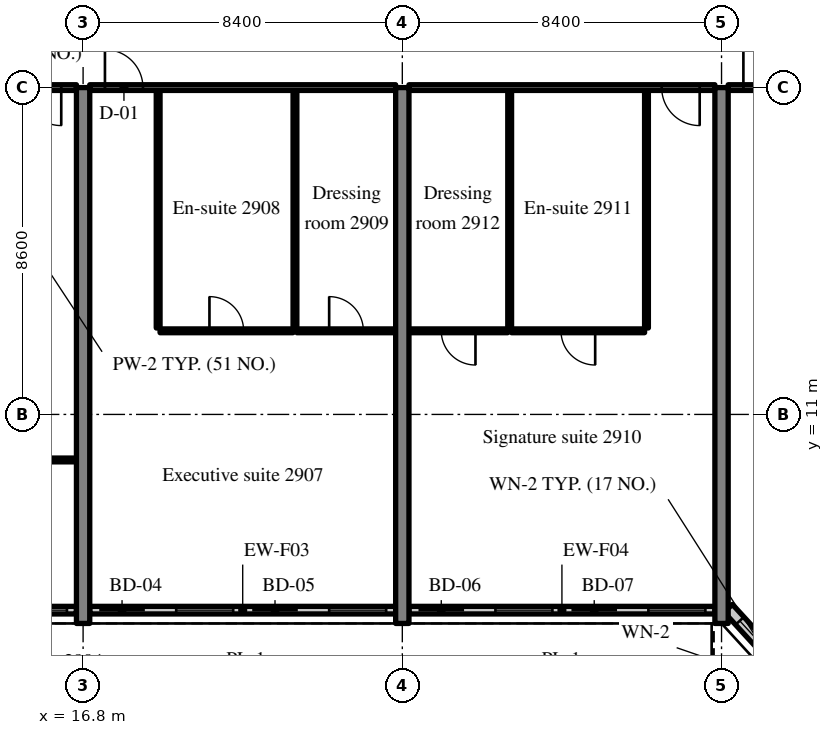
"""IFC4 building model, lengths in metres.
Left out: names, types, materials, properties, quantities, classifications, styles, units other than length and angle.
Written with IfcOpenShell. Run it as: python <this file> out.ifc"""

import sys

from ifc_helpers import new_model, si_unit, direction, frame, frame_2d, origin, place, context, subcontext, project, spatial, rectangle, extrude, source, transform, mapped, element, fill, save


model = new_model("IFC4")
c1 = context("Model", 3, precision=1e-05, world=origin(), true_north=direction((0.0, 1.0)))
c2 = subcontext(c1, "Body", "Model", "MODEL_VIEW")
j1 = project(units=[si_unit("LENGTHUNIT", "METRE"), si_unit("PLANEANGLEUNIT", "RADIAN")], contexts=[c1])
p1 = place(None, origin())
s1 = spatial("IfcSite", under=j1, at=p1, CompositionType="ELEMENT")
p2 = place(p1, origin())
s2 = spatial("IfcBuilding", under=s1, at=p2, CompositionType="ELEMENT")
p3 = place(p2, frame((0.0, 0.0, 121.8)))
s3 = spatial("IfcBuildingStorey", under=s2, at=p3, CompositionType="ELEMENT", Elevation=121.8)
m1 = source(origin(), c2, "Body", "SweptSolid", [
    extrude(rectangle(XDim=14.1, YDim=0.35, at=frame_2d((7.05, 0.0))), origin(), (0.0, 0.0, 1.0), 3.52),
])
for number, where, z_axis, x_axis in (
    (1, (16.8, 5.5, 0.0), (0.0, 0.0, 1.0), (0.0, 1.0, 0.0)),
    (2, (25.2, 5.5, 0.0), (0.0, 0.0, 1.0), (0.0, 1.0, 0.0)),
    (3, (33.6, 5.5, 0.0), (0.0, 0.0, 1.0), (0.0, 1.0, 0.0)),
):
    element("IfcWall", number, at=place(p3, frame(where, z_axis=z_axis, x_axis=x_axis)), inside=s3, PredefinedType="SHEAR", context=c2, shape_type="MappedRepresentation", body=[
        mapped(m1, transform((0.0, 0.0, 0.0), scale=1.0)),
    ])
m2 = source(origin(), c2, "Body", "SweptSolid", [
    extrude(rectangle(XDim=8.05, YDim=0.2, at=frame_2d((4.025, 0.0))), origin(), (0.0, 0.0, 1.0), 2.82),
])
p4 = place(p3, frame((8.575, 5.85, 0.0), z_axis=(0.0, 0.0, 1.0), x_axis=(1.0, 0.0, 0.0)))
e4 = element("IfcWall", 4, at=p4, inside=s3, PredefinedType="SOLIDWALL", context=c2, shape_type="MappedRepresentation", body=[
    mapped(m2, transform((0.0, 0.0, 0.0), scale=1.0)),
])
m3 = source(origin(), c2, "Body", "SweptSolid", [
    extrude(rectangle(XDim=1.2, YDim=2.4, at=frame_2d((0.6, 1.2))), frame((0.0, 0.11, 0.0), z_axis=(0.0, -1.0, 0.0), x_axis=(1.0, 0.0, 0.0)), (0.0, 0.0, 1.0), 0.22),
])
p5 = place(p4, frame((0.25, 0.0, 0.0)))
e5 = element("IfcOpeningElement", 5, at=p5, cuts=e4, PredefinedType="OPENING", context=c2, shape_type="MappedRepresentation", body=[
    mapped(m3, transform((0.0, 0.0, 0.0), scale=1.0)),
])
m4 = source(origin(), c2, "Body", "SweptSolid", [
    extrude(rectangle(XDim=1.5, YDim=1.5, at=frame_2d((0.75, 0.75))), frame((0.0, 0.11, 0.0), z_axis=(0.0, -1.0, 0.0), x_axis=(1.0, 0.0, 0.0)), (0.0, 0.0, 1.0), 0.22),
])
p6 = place(p4, frame((2.275, 0.0, 0.9)))
e6 = element("IfcOpeningElement", 6, at=p6, cuts=e4, PredefinedType="OPENING", context=c2, shape_type="MappedRepresentation", body=[
    mapped(m4, transform((0.0, 0.0, 0.0), scale=1.0)),
])
p7 = place(p4, frame((4.275, 0.0, 0.0)))
e7 = element("IfcOpeningElement", 7, at=p7, cuts=e4, PredefinedType="OPENING", context=c2, shape_type="MappedRepresentation", body=[
    mapped(m3, transform((0.0, 0.0, 0.0), scale=1.0)),
])
p8 = place(p4, frame((6.3, 0.0, 0.9)))
e8 = element("IfcOpeningElement", 8, at=p8, cuts=e4, PredefinedType="OPENING", context=c2, shape_type="MappedRepresentation", body=[
    mapped(m4, transform((0.0, 0.0, 0.0), scale=1.0)),
])
m5 = source(origin(), c2, "Body", "SweptSolid", [
    extrude(rectangle(XDim=8.05, YDim=0.2, at=frame_2d((4.025, 0.0))), origin(), (0.0, 0.0, 1.0), 2.82),
])
p9 = place(p3, frame((16.975, 5.85, 0.0), z_axis=(0.0, 0.0, 1.0), x_axis=(1.0, 0.0, 0.0)))
e9 = element("IfcWall", 9, at=p9, inside=s3, PredefinedType="SOLIDWALL", context=c2, shape_type="MappedRepresentation", body=[
    mapped(m5, transform((0.0, 0.0, 0.0), scale=1.0)),
])
p10 = place(p9, frame((0.25, 0.0, 0.0)))
e10 = element("IfcOpeningElement", 10, at=p10, cuts=e9, PredefinedType="OPENING", context=c2, shape_type="MappedRepresentation", body=[
    mapped(m3, transform((0.0, 0.0, 0.0), scale=1.0)),
])
p11 = place(p9, frame((2.275, 0.0, 0.9)))
e11 = element("IfcOpeningElement", 11, at=p11, cuts=e9, PredefinedType="OPENING", context=c2, shape_type="MappedRepresentation", body=[
    mapped(m4, transform((0.0, 0.0, 0.0), scale=1.0)),
])
p12 = place(p9, frame((4.275, 0.0, 0.0)))
e12 = element("IfcOpeningElement", 12, at=p12, cuts=e9, PredefinedType="OPENING", context=c2, shape_type="MappedRepresentation", body=[
    mapped(m3, transform((0.0, 0.0, 0.0), scale=1.0)),
])
p13 = place(p9, frame((6.3, 0.0, 0.9)))
e13 = element("IfcOpeningElement", 13, at=p13, cuts=e9, PredefinedType="OPENING", context=c2, shape_type="MappedRepresentation", body=[
    mapped(m4, transform((0.0, 0.0, 0.0), scale=1.0)),
])
p14 = place(p3, frame((25.375, 5.85, 0.0), z_axis=(0.0, 0.0, 1.0), x_axis=(1.0, 0.0, 0.0)))
e14 = element("IfcWall", 14, at=p14, inside=s3, PredefinedType="SOLIDWALL", context=c2, shape_type="MappedRepresentation", body=[
    mapped(m2, transform((0.0, 0.0, 0.0), scale=1.0)),
])
p15 = place(p14, frame((0.25, 0.0, 0.0)))
e15 = element("IfcOpeningElement", 15, at=p15, cuts=e14, PredefinedType="OPENING", context=c2, shape_type="MappedRepresentation", body=[
    mapped(m3, transform((0.0, 0.0, 0.0), scale=1.0)),
])
p16 = place(p14, frame((2.275, 0.0, 0.9)))
e16 = element("IfcOpeningElement", 16, at=p16, cuts=e14, PredefinedType="OPENING", context=c2, shape_type="MappedRepresentation", body=[
    mapped(m4, transform((0.0, 0.0, 0.0), scale=1.0)),
])
p17 = place(p14, frame((4.275, 0.0, 0.0)))
e17 = element("IfcOpeningElement", 17, at=p17, cuts=e14, PredefinedType="OPENING", context=c2, shape_type="MappedRepresentation", body=[
    mapped(m3, transform((0.0, 0.0, 0.0), scale=1.0)),
])
p18 = place(p14, frame((6.3, 0.0, 0.9)))
e18 = element("IfcOpeningElement", 18, at=p18, cuts=e14, PredefinedType="OPENING", context=c2, shape_type="MappedRepresentation", body=[
    mapped(m4, transform((0.0, 0.0, 0.0), scale=1.0)),
])
m6 = source(origin(), c2, "Body", "SweptSolid", [
    extrude(rectangle(XDim=2.398, YDim=0.3, at=frame_2d((1.199, 0.0))), origin(), (0.0, 0.0, 1.0), 3.52),
])
p19 = place(p3, frame((33.776, 5.9, 0.0), z_axis=(0.0, 0.0, 1.0), x_axis=(0.675374189419, -0.737475222815, 0.0)))
e19 = element("IfcWall", 19, at=p19, inside=s3, PredefinedType="SOLIDWALL", context=c2, shape_type="MappedRepresentation", body=[
    mapped(m6, transform((0.0, 0.0, 0.0), scale=1.0)),
])
m7 = source(origin(), c2, "Body", "SweptSolid", [
    extrude(rectangle(XDim=1.5, YDim=2.0, at=frame_2d((0.75, 1.0))), frame((0.0, 0.16, 0.0), z_axis=(0.0, -1.0, 0.0), x_axis=(1.0, 0.0, 0.0)), (0.0, 0.0, 1.0), 0.32),
])
p20 = place(p19, frame((0.449, 0.0, 0.9)))
e20 = element("IfcOpeningElement", 20, at=p20, cuts=e19, PredefinedType="OPENING", context=c2, shape_type="MappedRepresentation", body=[
    mapped(m7, transform((0.0, 0.0, 0.0), scale=1.0)),
])
m8 = source(origin(), c2, "Body", "SweptSolid", [
    extrude(rectangle(XDim=8.05, YDim=0.1, at=frame_2d((4.025, 0.0))), origin(), (0.0, 0.0, 1.0), 3.52),
])
p21 = place(p3, frame((8.575, 9.802, 0.0), z_axis=(0.0, 0.0, 1.0), x_axis=(1.0, 0.0, 0.0)))
e21 = element("IfcWall", 21, at=p21, inside=s3, PredefinedType="PARTITIONING", context=c2, shape_type="MappedRepresentation", body=[
    mapped(m8, transform((0.0, 0.0, 0.0), scale=1.0)),
])
m9 = source(origin(), c2, "Body", "SweptSolid", [
    extrude(rectangle(XDim=1.8, YDim=2.1, at=frame_2d((0.9, 1.05))), frame((0.0, 0.06, 0.0), z_axis=(0.0, -1.0, 0.0), x_axis=(1.0, 0.0, 0.0)), (0.0, 0.0, 1.0), 0.12),
])
p22 = place(p21, frame((3.125, 0.0, 0.0)))
e22 = element("IfcOpeningElement", 22, at=p22, cuts=e21, PredefinedType="OPENING", context=c2, shape_type="MappedRepresentation", body=[
    mapped(m9, transform((0.0, 0.0, 0.0), scale=1.0)),
])
m10 = source(origin(), c2, "Body", "SweptSolid", [
    extrude(rectangle(XDim=8.05, YDim=0.15, at=frame_2d((4.025, 0.0))), origin(), (0.0, 0.0, 1.0), 2.82),
])
p23 = place(p3, frame((8.575, 19.6, 0.0), z_axis=(0.0, 0.0, 1.0), x_axis=(1.0, 0.0, 0.0)))
e23 = element("IfcWall", 23, at=p23, inside=s3, PredefinedType="PARTITIONING", context=c2, shape_type="MappedRepresentation", body=[
    mapped(m10, transform((0.0, 0.0, 0.0), scale=1.0)),
])
m11 = source(origin(), c2, "Body", "SweptSolid", [
    extrude(rectangle(XDim=1.0, YDim=2.1, at=frame_2d((0.5, 1.05))), frame((0.0, 0.085, 0.0), z_axis=(0.0, -1.0, 0.0), x_axis=(1.0, 0.0, 0.0)), (0.0, 0.0, 1.0), 0.17),
])
p24 = place(p23, frame((6.65, 0.0, 0.0)))
e24 = element("IfcOpeningElement", 24, at=p24, cuts=e23, PredefinedType="OPENING", context=c2, shape_type="MappedRepresentation", body=[
    mapped(m11, transform((0.0, 0.0, 0.0), scale=1.0)),
])
m12 = source(origin(), c2, "Body", "SweptSolid", [
    extrude(rectangle(XDim=6.25, YDim=0.1, at=frame_2d((3.125, 0.0))), origin(), (0.0, 0.0, 1.0), 3.52),
])
for number, where, z_axis, x_axis in (
    (25, (18.775, 13.275, 0.0), (0.0, 0.0, 1.0), (0.0, 1.0, 0.0)),
    (26, (22.375, 13.275, 0.0), (0.0, 0.0, 1.0), (0.0, 1.0, 0.0)),
):
    element("IfcWall", number, at=place(p3, frame(where, z_axis=z_axis, x_axis=x_axis)), inside=s3, PredefinedType="PARTITIONING", context=c2, shape_type="MappedRepresentation", body=[
        mapped(m12, transform((0.0, 0.0, 0.0), scale=1.0)),
    ])
m13 = source(origin(), c2, "Body", "SweptSolid", [
    extrude(rectangle(XDim=3.5, YDim=0.1, at=frame_2d((1.75, 0.0))), origin(), (0.0, 0.0, 1.0), 3.52),
])
p25 = place(p3, frame((18.825, 13.2, 0.0), z_axis=(0.0, 0.0, 1.0), x_axis=(1.0, 0.0, 0.0)))
e27 = element("IfcWall", 27, at=p25, inside=s3, PredefinedType="PARTITIONING", context=c2, shape_type="MappedRepresentation", body=[
    mapped(m13, transform((0.0, 0.0, 0.0), scale=1.0)),
])
m14 = source(origin(), c2, "Body", "SweptSolid", [
    extrude(rectangle(XDim=0.9, YDim=2.1, at=frame_2d((0.45, 1.05))), frame((0.0, 0.06, 0.0), z_axis=(0.0, -1.0, 0.0), x_axis=(1.0, 0.0, 0.0)), (0.0, 0.0, 1.0), 0.12),
])
p26 = place(p25, frame((1.3, 0.0, 0.0)))
e28 = element("IfcOpeningElement", 28, at=p26, cuts=e27, PredefinedType="OPENING", context=c2, shape_type="MappedRepresentation", body=[
    mapped(m14, transform((0.0, 0.0, 0.0), scale=1.0)),
])
m15 = source(origin(), c2, "Body", "SweptSolid", [
    extrude(rectangle(XDim=2.6, YDim=0.1, at=frame_2d((1.3, 0.0))), origin(), (0.0, 0.0, 1.0), 3.52),
])
p27 = place(p3, frame((22.425, 13.2, 0.0), z_axis=(0.0, 0.0, 1.0), x_axis=(1.0, 0.0, 0.0)))
e29 = element("IfcWall", 29, at=p27, inside=s3, PredefinedType="PARTITIONING", context=c2, shape_type="MappedRepresentation", body=[
    mapped(m15, transform((0.0, 0.0, 0.0), scale=1.0)),
])
p28 = place(p27, frame((0.85, 0.0, 0.0)))
e30 = element("IfcOpeningElement", 30, at=p28, cuts=e29, PredefinedType="OPENING", context=c2, shape_type="MappedRepresentation", body=[
    mapped(m14, transform((0.0, 0.0, 0.0), scale=1.0)),
])
m16 = source(origin(), c2, "Body", "SweptSolid", [
    extrude(rectangle(XDim=8.05, YDim=0.15, at=frame_2d((4.025, 0.0))), origin(), (0.0, 0.0, 1.0), 2.82),
])
p29 = place(p3, frame((16.975, 19.6, 0.0), z_axis=(0.0, 0.0, 1.0), x_axis=(1.0, 0.0, 0.0)))
e31 = element("IfcWall", 31, at=p29, inside=s3, PredefinedType="PARTITIONING", context=c2, shape_type="MappedRepresentation", body=[
    mapped(m16, transform((0.0, 0.0, 0.0), scale=1.0)),
])
p30 = place(p29, frame((0.4, 0.0, 0.0)))
e32 = element("IfcOpeningElement", 32, at=p30, cuts=e31, PredefinedType="OPENING", context=c2, shape_type="MappedRepresentation", body=[
    mapped(m11, transform((0.0, 0.0, 0.0), scale=1.0)),
])
for number, where, z_axis, x_axis in (
    (33, (31.625, 13.275, 0.0), (0.0, 0.0, 1.0), (0.0, 1.0, 0.0)),
    (34, (28.025, 13.275, 0.0), (0.0, 0.0, 1.0), (0.0, 1.0, 0.0)),
):
    element("IfcWall", number, at=place(p3, frame(where, z_axis=z_axis, x_axis=x_axis)), inside=s3, PredefinedType="PARTITIONING", context=c2, shape_type="MappedRepresentation", body=[
        mapped(m12, transform((0.0, 0.0, 0.0), scale=1.0)),
    ])
p31 = place(p3, frame((28.075, 13.2, 0.0), z_axis=(0.0, 0.0, 1.0), x_axis=(1.0, 0.0, 0.0)))
e35 = element("IfcWall", 35, at=p31, inside=s3, PredefinedType="PARTITIONING", context=c2, shape_type="MappedRepresentation", body=[
    mapped(m13, transform((0.0, 0.0, 0.0), scale=1.0)),
])
p32 = place(p31, frame((1.3, 0.0, 0.0)))
e36 = element("IfcOpeningElement", 36, at=p32, cuts=e35, PredefinedType="OPENING", context=c2, shape_type="MappedRepresentation", body=[
    mapped(m14, transform((0.0, 0.0, 0.0), scale=1.0)),
])
m17 = source(origin(), c2, "Body", "SweptSolid", [
    extrude(rectangle(XDim=2.6, YDim=0.1, at=frame_2d((1.3, 0.0))), origin(), (0.0, 0.0, 1.0), 3.52),
])
p33 = place(p3, frame((25.375, 13.2, 0.0), z_axis=(0.0, 0.0, 1.0), x_axis=(1.0, 0.0, 0.0)))
e37 = element("IfcWall", 37, at=p33, inside=s3, PredefinedType="PARTITIONING", context=c2, shape_type="MappedRepresentation", body=[
    mapped(m17, transform((0.0, 0.0, 0.0), scale=1.0)),
])
p34 = place(p33, frame((0.85, 0.0, 0.0)))
e38 = element("IfcOpeningElement", 38, at=p34, cuts=e37, PredefinedType="OPENING", context=c2, shape_type="MappedRepresentation", body=[
    mapped(m14, transform((0.0, 0.0, 0.0), scale=1.0)),
])
p35 = place(p3, frame((25.375, 19.6, 0.0), z_axis=(0.0, 0.0, 1.0), x_axis=(1.0, 0.0, 0.0)))
e39 = element("IfcWall", 39, at=p35, inside=s3, PredefinedType="PARTITIONING", context=c2, shape_type="MappedRepresentation", body=[
    mapped(m10, transform((0.0, 0.0, 0.0), scale=1.0)),
])
p36 = place(p35, frame((6.65, 0.0, 0.0)))
e40 = element("IfcOpeningElement", 40, at=p36, cuts=e39, PredefinedType="OPENING", context=c2, shape_type="MappedRepresentation", body=[
    mapped(m11, transform((0.0, 0.0, 0.0), scale=1.0)),
])
p37 = place(p3, frame((33.775, 19.6, 0.0), z_axis=(0.0, 0.0, 1.0), x_axis=(1.0, 0.0, 0.0)))
e41 = element("IfcWall", 41, at=p37, inside=s3, PredefinedType="PARTITIONING", context=c2, shape_type="MappedRepresentation", body=[
    mapped(m10, transform((0.0, 0.0, 0.0), scale=1.0)),
])
p38 = place(p37, frame((0.4, 0.0, 0.0)))
e42 = element("IfcOpeningElement", 42, at=p38, cuts=e41, PredefinedType="OPENING", context=c2, shape_type="MappedRepresentation", body=[
    mapped(m11, transform((0.0, 0.0, 0.0), scale=1.0)),
])
m18 = source(origin(), c2, "Body", "SweptSolid", [
    extrude(rectangle(XDim=1.5, YDim=1.5, at=frame_2d((0.75, 0.75))), frame((0.0, 0.03, 0.0), z_axis=(0.0, -1.0, 0.0), x_axis=(1.0, 0.0, 0.0)), (0.0, 0.0, 1.0), 0.06),
])
p39 = place(p8, origin())
e43 = element("IfcWindow", 43, at=p39, inside=s3, PartitioningType="SINGLE_PANEL", PredefinedType="WINDOW", context=c2, shape_type="MappedRepresentation", body=[
    mapped(m18, transform((0.0, 0.0, 0.0), scale=1.0)),
])
fill(e8, e43)
m19 = source(origin(), c2, "Body", "SweptSolid", [
    extrude(rectangle(XDim=1.2, YDim=2.4, at=frame_2d((0.6, 1.2))), frame((0.0, 0.025, 0.0), z_axis=(0.0, -1.0, 0.0), x_axis=(1.0, 0.0, 0.0)), (0.0, 0.0, 1.0), 0.05),
])
p40 = place(p10, origin())
e44 = element("IfcDoor", 44, at=p40, inside=s3, OperationType="SLIDING_TO_RIGHT", PredefinedType="DOOR", context=c2, shape_type="MappedRepresentation", body=[
    mapped(m19, transform((0.0, 0.0, 0.0), scale=1.0)),
])
fill(e10, e44)
p41 = place(p11, origin())
e45 = element("IfcWindow", 45, at=p41, inside=s3, PartitioningType="SINGLE_PANEL", PredefinedType="WINDOW", context=c2, shape_type="MappedRepresentation", body=[
    mapped(m18, transform((0.0, 0.0, 0.0), scale=1.0)),
])
fill(e11, e45)
p42 = place(p12, origin())
e46 = element("IfcDoor", 46, at=p42, inside=s3, OperationType="SLIDING_TO_LEFT", PredefinedType="DOOR", context=c2, shape_type="MappedRepresentation", body=[
    mapped(m19, transform((0.0, 0.0, 0.0), scale=1.0)),
])
fill(e12, e46)
p43 = place(p13, origin())
e47 = element("IfcWindow", 47, at=p43, inside=s3, PartitioningType="SINGLE_PANEL", PredefinedType="WINDOW", context=c2, shape_type="MappedRepresentation", body=[
    mapped(m18, transform((0.0, 0.0, 0.0), scale=1.0)),
])
fill(e13, e47)
p44 = place(p15, origin())
e48 = element("IfcDoor", 48, at=p44, inside=s3, OperationType="SLIDING_TO_RIGHT", PredefinedType="DOOR", context=c2, shape_type="MappedRepresentation", body=[
    mapped(m19, transform((0.0, 0.0, 0.0), scale=1.0)),
])
fill(e15, e48)
p45 = place(p16, origin())
e49 = element("IfcWindow", 49, at=p45, inside=s3, PartitioningType="SINGLE_PANEL", PredefinedType="WINDOW", context=c2, shape_type="MappedRepresentation", body=[
    mapped(m18, transform((0.0, 0.0, 0.0), scale=1.0)),
])
fill(e16, e49)
p46 = place(p17, origin())
e50 = element("IfcDoor", 50, at=p46, inside=s3, OperationType="SLIDING_TO_LEFT", PredefinedType="DOOR", context=c2, shape_type="MappedRepresentation", body=[
    mapped(m19, transform((0.0, 0.0, 0.0), scale=1.0)),
])
fill(e17, e50)
p47 = place(p18, origin())
e51 = element("IfcWindow", 51, at=p47, inside=s3, PartitioningType="SINGLE_PANEL", PredefinedType="WINDOW", context=c2, shape_type="MappedRepresentation", body=[
    mapped(m18, transform((0.0, 0.0, 0.0), scale=1.0)),
])
fill(e18, e51)
m20 = source(origin(), c2, "Body", "SweptSolid", [
    extrude(rectangle(XDim=1.5, YDim=2.0, at=frame_2d((0.75, 1.0))), frame((0.0, 0.03, 0.0), z_axis=(0.0, -1.0, 0.0), x_axis=(1.0, 0.0, 0.0)), (0.0, 0.0, 1.0), 0.06),
])
p48 = place(p20, origin())
e52 = element("IfcWindow", 52, at=p48, inside=s3, PartitioningType="SINGLE_PANEL", PredefinedType="WINDOW", context=c2, shape_type="MappedRepresentation", body=[
    mapped(m20, transform((0.0, 0.0, 0.0), scale=1.0)),
])
fill(e20, e52)
m21 = source(origin(), c2, "Body", "SweptSolid", [
    extrude(rectangle(XDim=1.0, YDim=2.1, at=frame_2d((0.5, 1.05))), frame((0.0, 0.025, 0.0), z_axis=(0.0, -1.0, 0.0), x_axis=(1.0, 0.0, 0.0)), (0.0, 0.0, 1.0), 0.05),
])
p49 = place(p24, origin())
e53 = element("IfcDoor", 53, at=p49, inside=s3, OperationType="SINGLE_SWING_RIGHT", PredefinedType="DOOR", context=c2, shape_type="MappedRepresentation", body=[
    mapped(m21, transform((0.0, 0.0, 0.0), scale=1.0)),
])
fill(e24, e53)
m22 = source(origin(), c2, "Body", "SweptSolid", [
    extrude(rectangle(XDim=0.9, YDim=2.1, at=frame_2d((0.45, 1.05))), frame((0.0, 0.025, 0.0), z_axis=(0.0, -1.0, 0.0), x_axis=(1.0, 0.0, 0.0)), (0.0, 0.0, 1.0), 0.05),
])
p50 = place(p26, origin())
e54 = element("IfcDoor", 54, at=p50, inside=s3, OperationType="SINGLE_SWING_LEFT", PredefinedType="DOOR", context=c2, shape_type="MappedRepresentation", body=[
    mapped(m22, transform((0.0, 0.0, 0.0), scale=1.0)),
])
fill(e28, e54)
p51 = place(p28, origin())
e55 = element("IfcDoor", 55, at=p51, inside=s3, OperationType="SINGLE_SWING_LEFT", PredefinedType="DOOR", context=c2, shape_type="MappedRepresentation", body=[
    mapped(m22, transform((0.0, 0.0, 0.0), scale=1.0)),
])
fill(e30, e55)
p52 = place(p30, origin())
e56 = element("IfcDoor", 56, at=p52, inside=s3, OperationType="SINGLE_SWING_LEFT", PredefinedType="DOOR", context=c2, shape_type="MappedRepresentation", body=[
    mapped(m21, transform((0.0, 0.0, 0.0), scale=1.0)),
])
fill(e32, e56)
p53 = place(p32, origin())
e57 = element("IfcDoor", 57, at=p53, inside=s3, OperationType="SINGLE_SWING_RIGHT", PredefinedType="DOOR", context=c2, shape_type="MappedRepresentation", body=[
    mapped(m22, transform((0.0, 0.0, 0.0), scale=1.0)),
])
fill(e36, e57)
p54 = place(p34, origin())
e58 = element("IfcDoor", 58, at=p54, inside=s3, OperationType="SINGLE_SWING_RIGHT", PredefinedType="DOOR", context=c2, shape_type="MappedRepresentation", body=[
    mapped(m22, transform((0.0, 0.0, 0.0), scale=1.0)),
])
fill(e38, e58)
p55 = place(p36, origin())
e59 = element("IfcDoor", 59, at=p55, inside=s3, OperationType="SINGLE_SWING_RIGHT", PredefinedType="DOOR", context=c2, shape_type="MappedRepresentation", body=[
    mapped(m21, transform((0.0, 0.0, 0.0), scale=1.0)),
])
fill(e40, e59)
p56 = place(p38, origin())
e60 = element("IfcDoor", 60, at=p56, inside=s3, OperationType="SINGLE_SWING_LEFT", PredefinedType="DOOR", context=c2, shape_type="MappedRepresentation", body=[
    mapped(m21, transform((0.0, 0.0, 0.0), scale=1.0)),
])
fill(e42, e60)
save(model, sys.argv[1])
